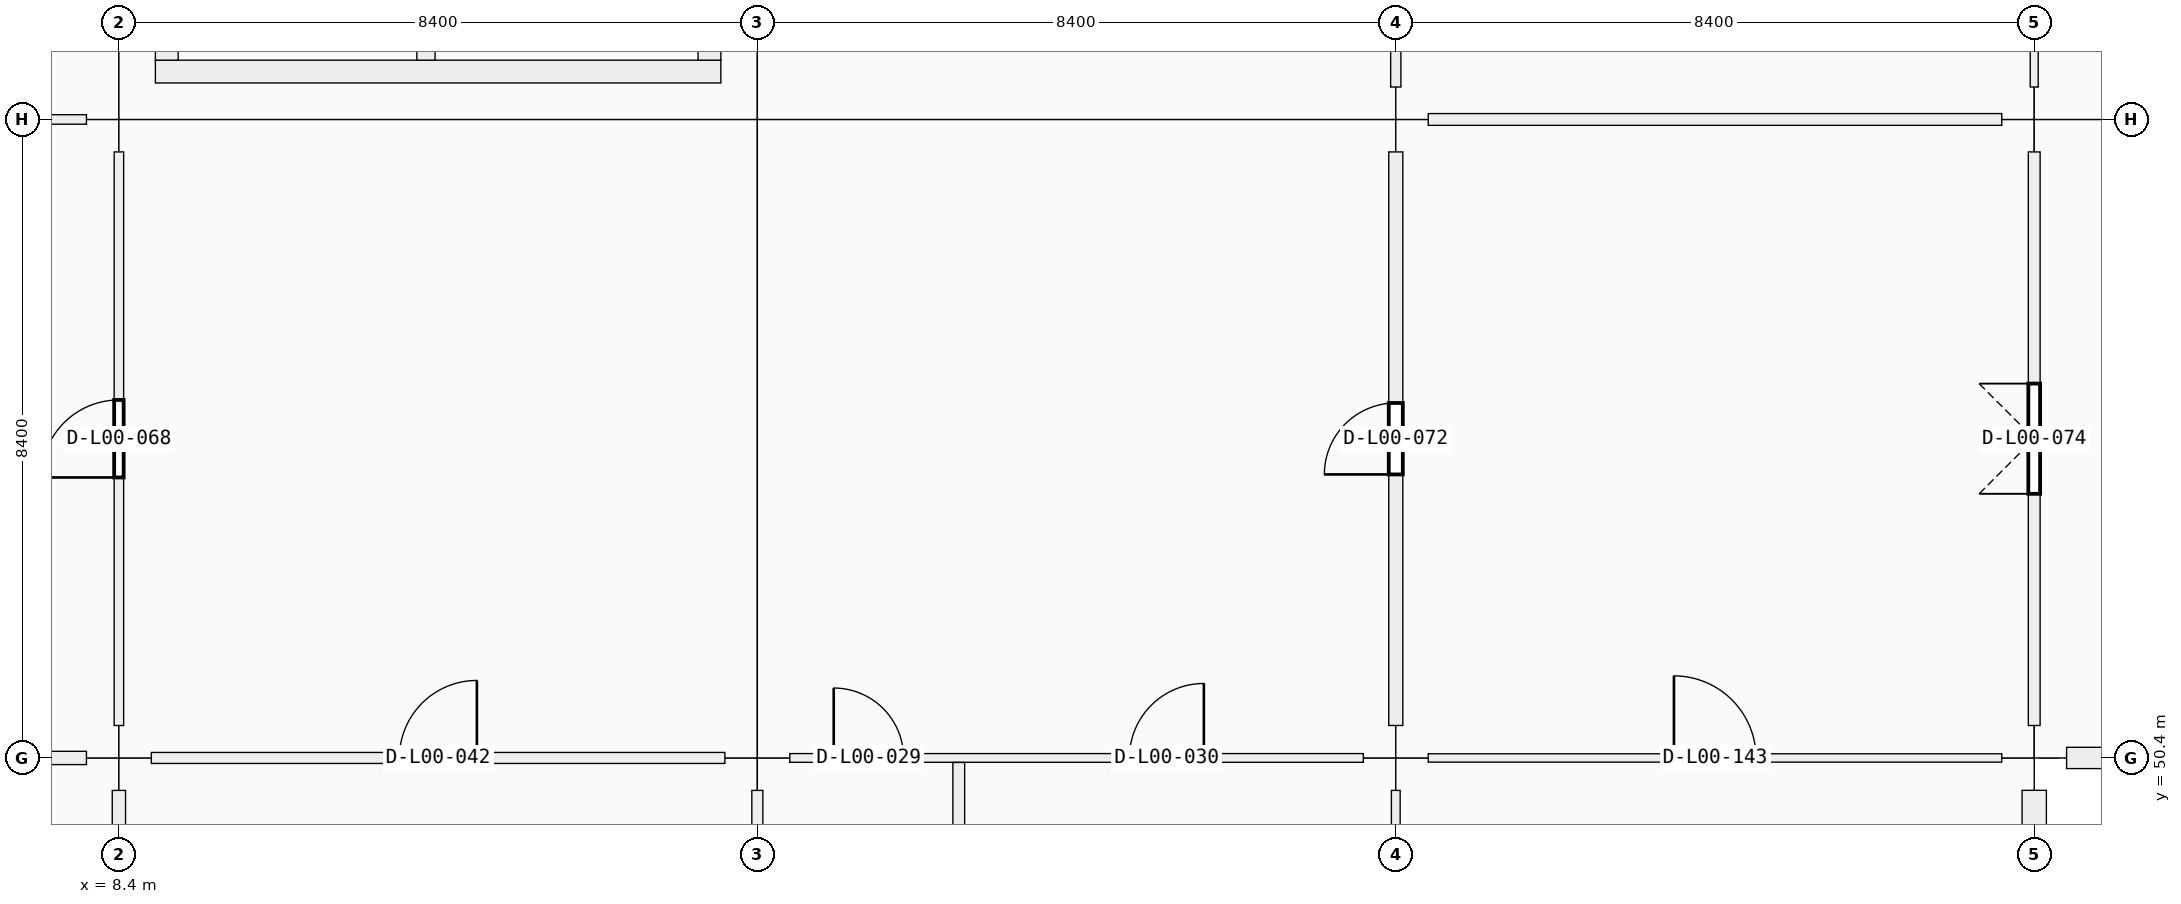
"""IFC4 building model, lengths in metres.
Left out: names, types, materials, properties, quantities, classifications, styles, units other than length and angle.
Written with IfcOpenShell. Run it as: python <this file> out.ifc"""

import sys

from ifc_helpers import new_model, si_unit, direction, frame, frame_2d, origin, origin_2d, place, context, subcontext, project, spatial, rectangle, extrude, element, fill, save


model = new_model("IFC4")
c1 = context("Model", 3, precision=1e-05, world=origin(), true_north=direction((0.0, 1.0)))
c2 = subcontext(c1, "Body", "Model", "MODEL_VIEW")
j1 = project(units=[si_unit("LENGTHUNIT", "METRE"), si_unit("PLANEANGLEUNIT", "RADIAN")], contexts=[c1])
p1 = place(None, origin())
s1 = spatial("IfcSite", under=j1, at=p1, CompositionType="ELEMENT")
p2 = place(p1, origin())
s2 = spatial("IfcBuilding", under=s1, at=p2, CompositionType="ELEMENT")
p3 = place(p2, origin())
s3 = spatial("IfcBuildingStorey", under=s2, at=p3, CompositionType="ELEMENT", Elevation=0.0)
for number, where, z_axis, x_axis in (
    (1, (8.4, 50.4, 0.0), (0.0, 0.0, 1.0), (1.0, 0.0, 0.0)),
    (2, (8.4, 58.8, 0.0), (0.0, 0.0, 1.0), (1.0, 0.0, 0.0)),
    (3, (16.8, 50.4, 0.0), (0.0, 0.0, 1.0), (1.0, 0.0, 0.0)),
    (4, (16.8, 58.8, 0.0), (0.0, 0.0, 1.0), (1.0, 0.0, 0.0)),
    (5, (25.2, 50.4, 0.0), (0.0, 0.0, 1.0), (1.0, 0.0, 0.0)),
    (6, (25.2, 58.8, 0.0), (0.0, 0.0, 1.0), (1.0, 0.0, 0.0)),
    (7, (33.6, 50.4, 0.0), (0.0, 0.0, 1.0), (1.0, 0.0, 0.0)),
    (8, (33.6, 58.8, 0.0), (0.0, 0.0, 1.0), (1.0, 0.0, 0.0)),
):
    element("IfcColumn", number, at=place(p3, frame(where, z_axis=z_axis, x_axis=x_axis)), inside=s3, PredefinedType="COLUMN", context=c2, shape_type="SweptSolid", body=[
        extrude(rectangle(XDim=0.85, YDim=0.85, at=origin_2d()), origin(), (0.0, 0.0, 1.0), 5.76),
    ])
p4 = place(p3, frame((33.6, 49.974, 0.0), z_axis=(0.0, 0.0, 1.0), x_axis=(0.0, -1.0, 0.0)))
e9 = element("IfcWall", 9, at=p4, inside=s3, PredefinedType="SOLIDWALL", context=c2, shape_type="SweptSolid", body=[
    extrude(rectangle(XDim=7.548, YDim=0.32, at=frame_2d((3.774, 0.0))), origin(), (0.0, 0.0, 1.0), 4.7),
])
p5 = place(p4, frame((2.674, 0.0, 0.9)))
e10 = element("IfcOpeningElement", 10, at=p5, cuts=e9, PredefinedType="OPENING", context=c2, shape_type="SweptSolid", body=[
    extrude(rectangle(XDim=2.2, YDim=1.75, at=frame_2d((1.1, 0.875))), frame((0.0, 0.16, 0.0), z_axis=(0.0, -1.0, 0.0), x_axis=(1.0, 0.0, 0.0)), (0.0, 0.0, 1.0), 0.32),
])
p6 = place(p3, frame((41.599, 50.4, 0.0), z_axis=(0.0, 0.0, 1.0), x_axis=(-1.0, 0.0, 0.0)))
e11 = element("IfcWall", 11, at=p6, inside=s3, PredefinedType="SOLIDWALL", context=c2, shape_type="SweptSolid", body=[
    extrude(rectangle(XDim=7.573, YDim=0.28, at=frame_2d((3.787, 0.0))), origin(), (0.0, 0.0, 1.0), 4.7),
])
p7 = place(p3, frame((16.32, 59.43, 0.0), z_axis=(0.0, 0.0, 1.0), x_axis=(-1.0, 0.0, 0.0)))
e12 = element("IfcWall", 12, at=p7, inside=s3, PredefinedType="SHEAR", context=c2, shape_type="SweptSolid", body=[
    extrude(rectangle(XDim=7.44, YDim=0.3, at=frame_2d((3.72, 0.0))), origin(), (0.0, 0.0, 1.0), 5.76),
])
p8 = place(p7, frame((1.28, 0.0, 0.0)))
e13 = element("IfcOpeningElement", 13, at=p8, cuts=e12, PredefinedType="OPENING", context=c2, shape_type="SweptSolid", body=[
    extrude(rectangle(XDim=1.5, YDim=2.15, at=frame_2d((0.75, 1.075))), frame((0.0, 0.15, 0.0), z_axis=(0.0, -1.0, 0.0), x_axis=(1.0, 0.0, 0.0)), (0.0, 0.0, 1.0), 0.3),
])
p9 = place(p3, frame((9.03, 59.58, 0.0), z_axis=(0.0, 0.0, 1.0), x_axis=(0.0, 1.0, 0.0)))
e14 = element("IfcWall", 14, at=p9, inside=s3, PredefinedType="SHEAR", context=c2, shape_type="SweptSolid", body=[
    extrude(rectangle(XDim=6.84, YDim=0.3, at=frame_2d((3.42, 0.0))), origin(), (0.0, 0.0, 1.0), 5.76),
])
p10 = place(p9, frame((0.12, 0.0, 0.0)))
e15 = element("IfcOpeningElement", 15, at=p10, cuts=e14, PredefinedType="OPENING", context=c2, shape_type="SweptSolid", body=[
    extrude(rectangle(XDim=1.0, YDim=2.15, at=frame_2d((0.5, 1.075))), frame((0.0, 0.15, 0.0), z_axis=(0.0, -1.0, 0.0), x_axis=(1.0, 0.0, 0.0)), (0.0, 0.0, 1.0), 0.3),
])
p11 = place(p3, frame((16.17, 66.42, 0.0), z_axis=(0.0, 0.0, 1.0), x_axis=(0.0, -1.0, 0.0)))
e16 = element("IfcWall", 16, at=p11, inside=s3, PredefinedType="SHEAR", context=c2, shape_type="SweptSolid", body=[
    extrude(rectangle(XDim=6.84, YDim=0.3, at=frame_2d((3.42, 0.0))), origin(), (0.0, 0.0, 1.0), 5.76),
])
p12 = place(p3, frame((12.44, 59.58, 0.0), z_axis=(0.0, 0.0, 1.0), x_axis=(0.0, 1.0, 0.0)))
e17 = element("IfcWall", 17, at=p12, inside=s3, PredefinedType="SHEAR", context=c2, shape_type="SweptSolid", body=[
    extrude(rectangle(XDim=6.84, YDim=0.24, at=frame_2d((3.42, 0.0))), origin(), (0.0, 0.0, 1.0), 5.76),
])
p13 = place(p12, frame((0.12, 0.0, 0.0)))
e18 = element("IfcOpeningElement", 18, at=p13, cuts=e17, PredefinedType="OPENING", context=c2, shape_type="SweptSolid", body=[
    extrude(rectangle(XDim=1.0, YDim=2.15, at=frame_2d((0.5, 1.075))), frame((0.0, 0.12, 0.0), z_axis=(0.0, -1.0, 0.0), x_axis=(1.0, 0.0, 0.0)), (0.0, 0.0, 1.0), 0.24),
])
p14 = place(p3, frame((0.327, 50.4, 0.0), z_axis=(0.0, 0.0, 1.0), x_axis=(1.0, 0.0, 0.0)))
e19 = element("IfcWall", 19, at=p14, inside=s3, PredefinedType="PARTITIONING", context=c2, shape_type="SweptSolid", body=[
    extrude(rectangle(XDim=7.646, YDim=0.175, at=frame_2d((3.823, 0.0))), origin(), (0.0, 0.0, 1.0), 3.66),
])
p15 = place(p14, frame((3.318, 0.0, 0.0)))
e20 = element("IfcOpeningElement", 20, at=p15, cuts=e19, PredefinedType="OPENING", context=c2, shape_type="SweptSolid", body=[
    extrude(rectangle(XDim=1.01, YDim=2.12, at=frame_2d((0.505, 1.06))), frame((0.0, 0.087, 0.0), z_axis=(0.0, -1.0, 0.0), x_axis=(1.0, 0.0, 0.0)), (0.0, 0.0, 1.0), 0.175),
])
p16 = place(p3, frame((0.302, 58.8, 0.0), z_axis=(0.0, 0.0, 1.0), x_axis=(1.0, 0.0, 0.0)))
e21 = element("IfcWall", 21, at=p16, inside=s3, PredefinedType="PARTITIONING", context=c2, shape_type="SweptSolid", body=[
    extrude(rectangle(XDim=7.671, YDim=0.125, at=frame_2d((3.835, 0.0))), origin(), (0.0, 0.0, 1.0), 3.66),
])
p17 = place(p16, frame((3.316, 0.0, 0.0)))
e22 = element("IfcOpeningElement", 22, at=p17, cuts=e21, PredefinedType="OPENING", context=c2, shape_type="SweptSolid", body=[
    extrude(rectangle(XDim=1.04, YDim=2.2, at=frame_2d((0.52, 1.1))), frame((0.0, 0.062, 0.0), z_axis=(0.0, -1.0, 0.0), x_axis=(1.0, 0.0, 0.0)), (0.0, 0.0, 1.0), 0.125),
])
p18 = place(p3, frame((8.827, 50.4, 0.0), z_axis=(0.0, 0.0, 1.0), x_axis=(1.0, 0.0, 0.0)))
e23 = element("IfcWall", 23, at=p18, inside=s3, PredefinedType="PARTITIONING", context=c2, shape_type="SweptSolid", body=[
    extrude(rectangle(XDim=7.546, YDim=0.145, at=frame_2d((3.773, 0.0))), origin(), (0.0, 0.0, 1.0), 3.66),
])
p19 = place(p18, frame((3.263, 0.0, 0.0)))
e24 = element("IfcOpeningElement", 24, at=p19, cuts=e23, PredefinedType="OPENING", context=c2, shape_type="SweptSolid", body=[
    extrude(rectangle(XDim=1.02, YDim=2.2, at=frame_2d((0.51, 1.1))), frame((0.0, 0.073, 0.0), z_axis=(0.0, -1.0, 0.0), x_axis=(1.0, 0.0, 0.0)), (0.0, 0.0, 1.0), 0.145),
])
p20 = place(p3, frame((17.227, 50.4, 0.0), z_axis=(0.0, 0.0, 1.0), x_axis=(1.0, 0.0, 0.0)))
e25 = element("IfcWall", 25, at=p20, inside=s3, PredefinedType="PARTITIONING", context=c2, shape_type="SweptSolid", body=[
    extrude(rectangle(XDim=7.546, YDim=0.115, at=frame_2d((3.773, 0.0))), origin(), (0.0, 0.0, 1.0), 3.66),
])
p21 = place(p20, frame((0.578, 0.0, 0.0)))
e26 = element("IfcOpeningElement", 26, at=p21, cuts=e25, PredefinedType="OPENING", context=c2, shape_type="SweptSolid", body=[
    extrude(rectangle(XDim=0.92, YDim=2.1, at=frame_2d((0.46, 1.05))), frame((0.0, 0.058, 0.0), z_axis=(0.0, -1.0, 0.0), x_axis=(1.0, 0.0, 0.0)), (0.0, 0.0, 1.0), 0.115),
])
p22 = place(p20, frame((4.468, 0.0, 0.0)))
e27 = element("IfcOpeningElement", 27, at=p22, cuts=e25, PredefinedType="OPENING", context=c2, shape_type="SweptSolid", body=[
    extrude(rectangle(XDim=0.98, YDim=2.08, at=frame_2d((0.49, 1.04))), frame((0.0, 0.058, 0.0), z_axis=(0.0, -1.0, 0.0), x_axis=(1.0, 0.0, 0.0)), (0.0, 0.0, 1.0), 0.115),
])
p23 = place(p3, frame((25.627, 50.4, 0.0), z_axis=(0.0, 0.0, 1.0), x_axis=(1.0, 0.0, 0.0)))
e28 = element("IfcWall", 28, at=p23, inside=s3, PredefinedType="MOVABLE", context=c2, shape_type="SweptSolid", body=[
    extrude(rectangle(XDim=7.546, YDim=0.11, at=frame_2d((3.773, 0.0))), origin(), (0.0, 0.0, 1.0), 3.66),
])
p24 = place(p23, frame((3.233, 0.0, 0.0)))
e29 = element("IfcOpeningElement", 29, at=p24, cuts=e28, PredefinedType="OPENING", context=c2, shape_type="SweptSolid", body=[
    extrude(rectangle(XDim=1.08, YDim=2.25, at=frame_2d((0.54, 1.125))), frame((0.0, 0.055, 0.0), z_axis=(0.0, -1.0, 0.0), x_axis=(1.0, 0.0, 0.0)), (0.0, 0.0, 1.0), 0.11),
])
p25 = place(p3, frame((25.627, 58.8, 0.0), z_axis=(0.0, 0.0, 1.0), x_axis=(1.0, 0.0, 0.0)))
e30 = element("IfcWall", 30, at=p25, inside=s3, PredefinedType="PARTITIONING", context=c2, shape_type="SweptSolid", body=[
    extrude(rectangle(XDim=7.546, YDim=0.155, at=frame_2d((3.773, 0.0))), origin(), (0.0, 0.0, 1.0), 3.66),
])
p26 = place(p25, frame((3.243, 0.0, 0.0)))
e31 = element("IfcOpeningElement", 31, at=p26, cuts=e30, PredefinedType="OPENING", context=c2, shape_type="SweptSolid", body=[
    extrude(rectangle(XDim=1.06, YDim=2.25, at=frame_2d((0.53, 1.125))), frame((0.0, 0.078, 0.0), z_axis=(0.0, -1.0, 0.0), x_axis=(1.0, 0.0, 0.0)), (0.0, 0.0, 1.0), 0.155),
])
p27 = place(p3, frame((8.4, 42.427, 0.0), z_axis=(0.0, 0.0, 1.0), x_axis=(0.0, 1.0, 0.0)))
e32 = element("IfcWall", 32, at=p27, inside=s3, PredefinedType="PARTITIONING", context=c2, shape_type="SweptSolid", body=[
    extrude(rectangle(XDim=7.546, YDim=0.175, at=frame_2d((3.773, 0.0))), origin(), (0.0, 0.0, 1.0), 3.66),
])
p28 = place(p27, frame((3.303, 0.0, 0.0)))
e33 = element("IfcOpeningElement", 33, at=p28, cuts=e32, PredefinedType="OPENING", context=c2, shape_type="SweptSolid", body=[
    extrude(rectangle(XDim=0.94, YDim=2.15, at=frame_2d((0.47, 1.075))), frame((0.0, 0.087, 0.0), z_axis=(0.0, -1.0, 0.0), x_axis=(1.0, 0.0, 0.0)), (0.0, 0.0, 1.0), 0.175),
])
p29 = place(p3, frame((8.4, 50.827, 0.0), z_axis=(0.0, 0.0, 1.0), x_axis=(0.0, 1.0, 0.0)))
e34 = element("IfcWall", 34, at=p29, inside=s3, PredefinedType="PARTITIONING", context=c2, shape_type="SweptSolid", body=[
    extrude(rectangle(XDim=7.546, YDim=0.125, at=frame_2d((3.773, 0.0))), origin(), (0.0, 0.0, 1.0), 3.66),
])
p30 = place(p29, frame((3.263, 0.0, 0.0)))
e35 = element("IfcOpeningElement", 35, at=p30, cuts=e34, PredefinedType="OPENING", context=c2, shape_type="SweptSolid", body=[
    extrude(rectangle(XDim=1.02, YDim=2.2, at=frame_2d((0.51, 1.1))), frame((0.0, 0.062, 0.0), z_axis=(0.0, -1.0, 0.0), x_axis=(1.0, 0.0, 0.0)), (0.0, 0.0, 1.0), 0.125),
])
p31 = place(p3, frame((16.8, 42.427, 0.0), z_axis=(0.0, 0.0, 1.0), x_axis=(0.0, 1.0, 0.0)))
e36 = element("IfcWall", 36, at=p31, inside=s3, PredefinedType="PARTITIONING", context=c2, shape_type="SweptSolid", body=[
    extrude(rectangle(XDim=7.546, YDim=0.145, at=frame_2d((3.773, 0.0))), origin(), (0.0, 0.0, 1.0), 3.66),
])
p32 = place(p3, frame((25.2, 42.427, 0.0), z_axis=(0.0, 0.0, 1.0), x_axis=(0.0, 1.0, 0.0)))
e37 = element("IfcWall", 37, at=p32, inside=s3, PredefinedType="PARTITIONING", context=c2, shape_type="SweptSolid", body=[
    extrude(rectangle(XDim=7.546, YDim=0.115, at=frame_2d((3.773, 0.0))), origin(), (0.0, 0.0, 1.0), 3.66),
])
p33 = place(p3, frame((25.2, 50.827, 0.0), z_axis=(0.0, 0.0, 1.0), x_axis=(0.0, 1.0, 0.0)))
e38 = element("IfcWall", 38, at=p33, inside=s3, PredefinedType="PARTITIONING", context=c2, shape_type="SweptSolid", body=[
    extrude(rectangle(XDim=7.546, YDim=0.185, at=frame_2d((3.773, 0.0))), origin(), (0.0, 0.0, 1.0), 3.66),
])
p34 = place(p33, frame((3.303, 0.0, 0.0)))
e39 = element("IfcOpeningElement", 39, at=p34, cuts=e38, PredefinedType="OPENING", context=c2, shape_type="SweptSolid", body=[
    extrude(rectangle(XDim=0.94, YDim=2.15, at=frame_2d((0.47, 1.075))), frame((0.0, 0.093, 0.0), z_axis=(0.0, -1.0, 0.0), x_axis=(1.0, 0.0, 0.0)), (0.0, 0.0, 1.0), 0.185),
])
p35 = place(p3, frame((25.2, 59.227, 0.0), z_axis=(0.0, 0.0, 1.0), x_axis=(0.0, 1.0, 0.0)))
e40 = element("IfcWall", 40, at=p35, inside=s3, PredefinedType="PARTITIONING", context=c2, shape_type="SweptSolid", body=[
    extrude(rectangle(XDim=7.546, YDim=0.135, at=frame_2d((3.773, 0.0))), origin(), (0.0, 0.0, 1.0), 3.66),
])
p36 = place(p35, frame((3.313, 0.0, 0.0)))
e41 = element("IfcOpeningElement", 41, at=p36, cuts=e40, PredefinedType="OPENING", context=c2, shape_type="SweptSolid", body=[
    extrude(rectangle(XDim=0.92, YDim=2.15, at=frame_2d((0.46, 1.075))), frame((0.0, 0.067, 0.0), z_axis=(0.0, -1.0, 0.0), x_axis=(1.0, 0.0, 0.0)), (0.0, 0.0, 1.0), 0.135),
])
p37 = place(p3, frame((33.6, 50.827, 0.0), z_axis=(0.0, 0.0, 1.0), x_axis=(0.0, 1.0, 0.0)))
e42 = element("IfcWall", 42, at=p37, inside=s3, PredefinedType="PARTITIONING", context=c2, shape_type="SweptSolid", body=[
    extrude(rectangle(XDim=7.546, YDim=0.155, at=frame_2d((3.773, 0.0))), origin(), (0.0, 0.0, 1.0), 3.66),
])
p38 = place(p37, frame((3.048, 0.0, 0.0)))
e43 = element("IfcOpeningElement", 43, at=p38, cuts=e42, PredefinedType="OPENING", context=c2, shape_type="SweptSolid", body=[
    extrude(rectangle(XDim=1.45, YDim=2.2, at=frame_2d((0.725, 1.1))), frame((0.0, 0.078, 0.0), z_axis=(0.0, -1.0, 0.0), x_axis=(1.0, 0.0, 0.0)), (0.0, 0.0, 1.0), 0.155),
])
p39 = place(p3, frame((33.6, 59.227, 0.0), z_axis=(0.0, 0.0, 1.0), x_axis=(0.0, 1.0, 0.0)))
e44 = element("IfcWall", 44, at=p39, inside=s3, PredefinedType="PARTITIONING", context=c2, shape_type="SweptSolid", body=[
    extrude(rectangle(XDim=7.546, YDim=0.105, at=frame_2d((3.773, 0.0))), origin(), (0.0, 0.0, 1.0), 3.66),
])
p40 = place(p39, frame((3.073, 0.0, 0.0)))
e45 = element("IfcOpeningElement", 45, at=p40, cuts=e44, PredefinedType="OPENING", context=c2, shape_type="SweptSolid", body=[
    extrude(rectangle(XDim=1.4, YDim=2.25, at=frame_2d((0.7, 1.125))), frame((0.0, 0.052, 0.0), z_axis=(0.0, -1.0, 0.0), x_axis=(1.0, 0.0, 0.0)), (0.0, 0.0, 1.0), 0.105),
])
p41 = place(p3, frame((19.45, 42.084, 0.0), z_axis=(0.0, 0.0, 1.0), x_axis=(0.0, 1.0, 0.0)))
e46 = element("IfcWall", 46, at=p41, inside=s3, PredefinedType="PARTITIONING", context=c2, shape_type="SweptSolid", body=[
    extrude(rectangle(XDim=8.256, YDim=0.155, at=frame_2d((4.128, 0.0))), origin(), (0.0, 0.0, 1.0), 3.66),
])
p42 = place(p8, origin())
e47 = element("IfcDoor", 47, at=p42, inside=s3, OperationType="DOUBLE_DOOR_SINGLE_SWING", PredefinedType="DOOR", context=c2, shape_type="SweptSolid", body=[
    extrude(rectangle(XDim=1.5, YDim=2.15, at=frame_2d((0.75, 1.075))), frame((0.0, 0.025, 0.0), z_axis=(0.0, -1.0, 0.0), x_axis=(1.0, 0.0, 0.0)), (0.0, 0.0, 1.0), 0.05),
])
fill(e13, e47)
p43 = place(p21, origin())
e48 = element("IfcDoor", 48, at=p43, inside=s3, OperationType="SINGLE_SWING_LEFT", PredefinedType="DOOR", context=c2, shape_type="SweptSolid", body=[
    extrude(rectangle(XDim=0.92, YDim=2.1, at=frame_2d((0.46, 1.05))), frame((0.0, 0.025, 0.0), z_axis=(0.0, -1.0, 0.0), x_axis=(1.0, 0.0, 0.0)), (0.0, 0.0, 1.0), 0.05),
])
fill(e26, e48)
p44 = place(p22, origin())
e49 = element("IfcDoor", 49, at=p44, inside=s3, OperationType="SINGLE_SWING_RIGHT", PredefinedType="DOOR", context=c2, shape_type="SweptSolid", body=[
    extrude(rectangle(XDim=0.98, YDim=2.08, at=frame_2d((0.49, 1.04))), frame((0.0, 0.025, 0.0), z_axis=(0.0, -1.0, 0.0), x_axis=(1.0, 0.0, 0.0)), (0.0, 0.0, 1.0), 0.05),
])
fill(e27, e49)
p45 = place(p19, origin())
e50 = element("IfcDoor", 50, at=p45, inside=s3, OperationType="SINGLE_SWING_RIGHT", PredefinedType="DOOR", context=c2, shape_type="SweptSolid", body=[
    extrude(rectangle(XDim=1.02, YDim=2.2, at=frame_2d((0.51, 1.1))), frame((0.0, 0.025, 0.0), z_axis=(0.0, -1.0, 0.0), x_axis=(1.0, 0.0, 0.0)), (0.0, 0.0, 1.0), 0.05),
])
fill(e24, e50)
p46 = place(p30, origin())
e51 = element("IfcDoor", 51, at=p46, inside=s3, OperationType="SINGLE_SWING_LEFT", PredefinedType="DOOR", context=c2, shape_type="SweptSolid", body=[
    extrude(rectangle(XDim=1.02, YDim=2.2, at=frame_2d((0.51, 1.1))), frame((0.0, 0.025, 0.0), z_axis=(0.0, -1.0, 0.0), x_axis=(1.0, 0.0, 0.0)), (0.0, 0.0, 1.0), 0.05),
])
fill(e35, e51)
p47 = place(p34, origin())
e52 = element("IfcDoor", 52, at=p47, inside=s3, OperationType="SINGLE_SWING_LEFT", PredefinedType="DOOR", context=c2, shape_type="SweptSolid", body=[
    extrude(rectangle(XDim=0.94, YDim=2.15, at=frame_2d((0.47, 1.075))), frame((0.0, 0.025, 0.0), z_axis=(0.0, -1.0, 0.0), x_axis=(1.0, 0.0, 0.0)), (0.0, 0.0, 1.0), 0.05),
])
fill(e39, e52)
p48 = place(p38, origin())
e53 = element("IfcDoor", 53, at=p48, inside=s3, OperationType="DOUBLE_DOOR_SINGLE_SWING", PredefinedType="DOOR", context=c2, shape_type="SweptSolid", body=[
    extrude(rectangle(XDim=1.45, YDim=2.2, at=frame_2d((0.725, 1.1))), frame((0.0, 0.025, 0.0), z_axis=(0.0, -1.0, 0.0), x_axis=(1.0, 0.0, 0.0)), (0.0, 0.0, 1.0), 0.05),
])
fill(e43, e53)
p49 = place(p24, origin())
e54 = element("IfcDoor", 54, at=p49, inside=s3, OperationType="SINGLE_SWING_LEFT", PredefinedType="DOOR", context=c2, shape_type="SweptSolid", body=[
    extrude(rectangle(XDim=1.08, YDim=2.25, at=frame_2d((0.54, 1.125))), frame((0.0, 0.025, 0.0), z_axis=(0.0, -1.0, 0.0), x_axis=(1.0, 0.0, 0.0)), (0.0, 0.0, 1.0), 0.05),
])
fill(e29, e54)
p50 = place(p26, origin())
e55 = element("IfcDoor", 55, at=p50, inside=s3, OperationType="SINGLE_SWING_RIGHT", PredefinedType="DOOR", context=c2, shape_type="SweptSolid", body=[
    extrude(rectangle(XDim=1.06, YDim=2.25, at=frame_2d((0.53, 1.125))), frame((0.0, 0.025, 0.0), z_axis=(0.0, -1.0, 0.0), x_axis=(1.0, 0.0, 0.0)), (0.0, 0.0, 1.0), 0.05),
])
fill(e31, e55)
save(model, sys.argv[1])
